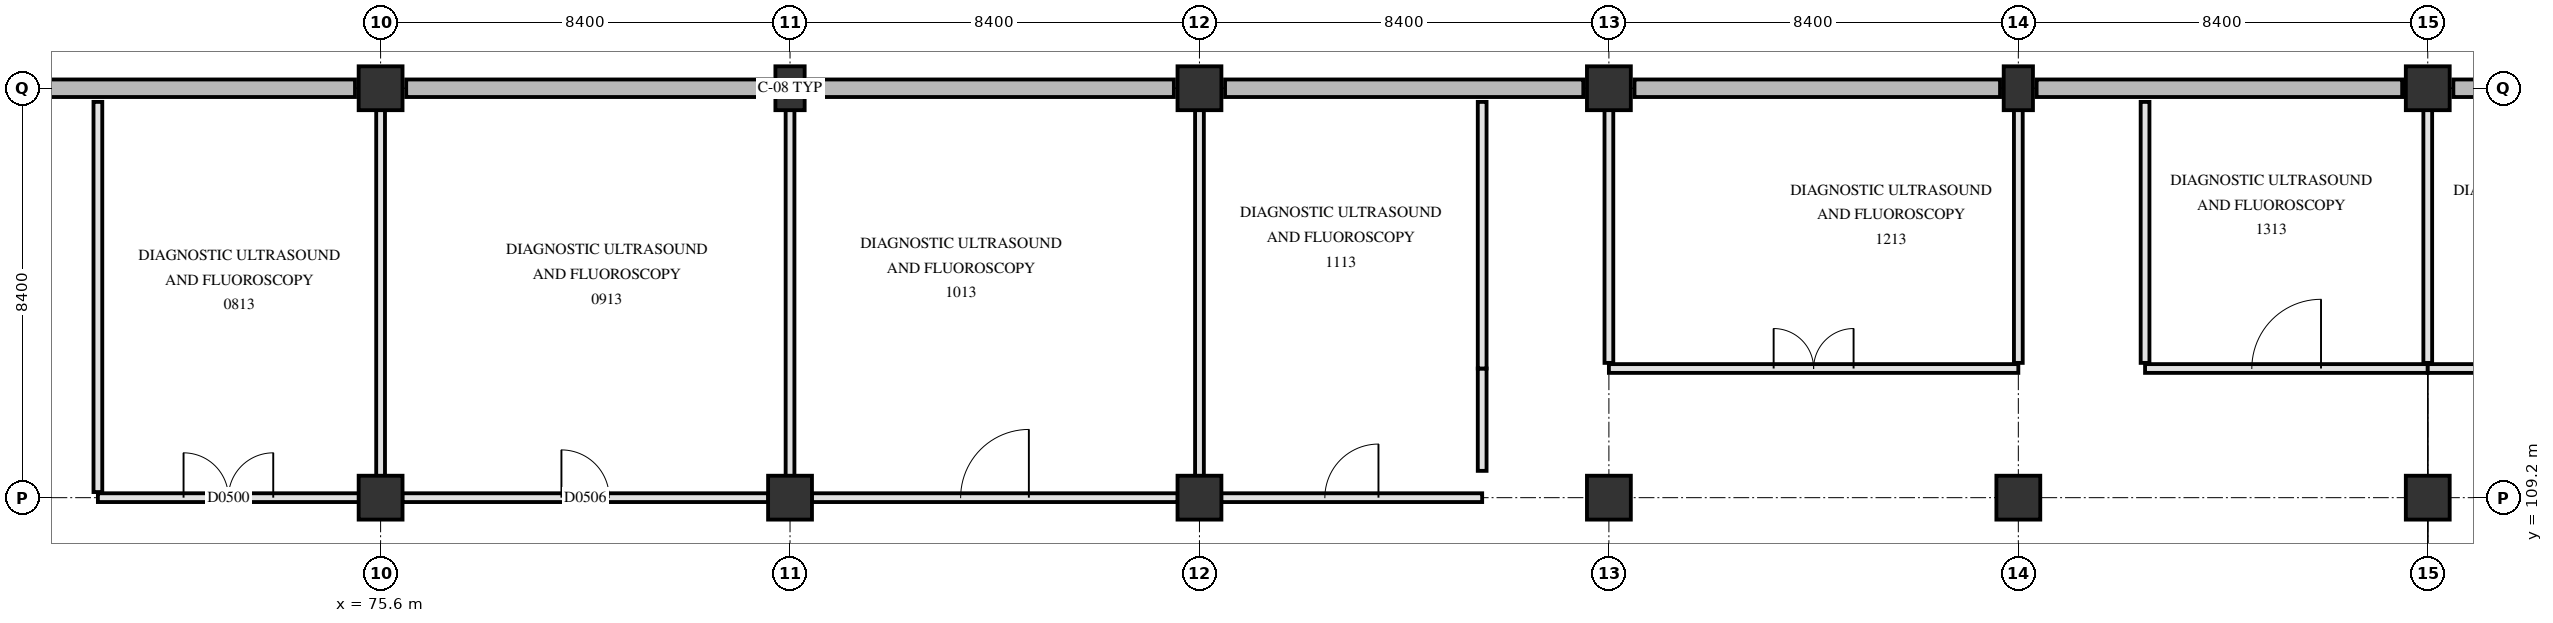
"""IFC4 building model, lengths in metres.
Left out: names, types, materials, properties, quantities, classifications, styles, units other than length and angle.
Written with IfcOpenShell. Run it as: python <this file> out.ifc"""

import sys

from ifc_helpers import new_model, si_unit, direction, frame, frame_2d, origin, origin_2d, place, context, subcontext, project, spatial, rectangle, extrude, element, fill, save


model = new_model("IFC4")
c1 = context("Model", 3, precision=1e-05, world=origin(), true_north=direction((0.0, 1.0)))
c2 = subcontext(c1, "Body", "Model", "MODEL_VIEW")
j1 = project(units=[si_unit("LENGTHUNIT", "METRE"), si_unit("PLANEANGLEUNIT", "RADIAN")], contexts=[c1])
p1 = place(None, origin())
s1 = spatial("IfcSite", under=j1, at=p1, CompositionType="ELEMENT")
p2 = place(p1, origin())
s2 = spatial("IfcBuilding", under=s1, at=p2, CompositionType="ELEMENT")
p3 = place(p2, origin())
s3 = spatial("IfcBuildingStorey", under=s2, at=p3, CompositionType="ELEMENT", Elevation=0.0)
for number, where, z_axis, x_axis in (
    (1, (75.6, 109.2, 0.0), (0.0, 0.0, 1.0), (1.0, 0.0, 0.0)),
    (2, (75.6, 117.6, 0.0), (0.0, 0.0, 1.0), (1.0, 0.0, 0.0)),
    (3, (84.0, 109.2, 0.0), (0.0, 0.0, 1.0), (1.0, 0.0, 0.0)),
):
    element("IfcColumn", number, at=place(p3, frame(where, z_axis=z_axis, x_axis=x_axis)), inside=s3, PredefinedType="COLUMN", context=c2, shape_type="SweptSolid", body=[
        extrude(rectangle(XDim=0.9, YDim=0.9, at=origin_2d()), origin(), (0.0, 0.0, 1.0), 4.8),
    ])
p4 = place(p3, frame((84.0, 117.6, 0.0), z_axis=(0.0, 0.0, 1.0), x_axis=(1.0, 0.0, 0.0)))
e4 = element("IfcColumn", 4, at=p4, inside=s3, PredefinedType="PILASTER", context=c2, shape_type="SweptSolid", body=[
    extrude(rectangle(XDim=0.6, YDim=0.9, at=origin_2d()), origin(), (0.0, 0.0, 1.0), 4.8),
])
for number, where, z_axis, x_axis in (
    (5, (92.4, 109.2, 0.0), (0.0, 0.0, 1.0), (1.0, 0.0, 0.0)),
    (6, (92.4, 117.6, 0.0), (0.0, 0.0, 1.0), (1.0, 0.0, 0.0)),
    (7, (100.8, 109.2, 0.0), (0.0, 0.0, 1.0), (1.0, 0.0, 0.0)),
    (8, (100.8, 117.6, 0.0), (0.0, 0.0, 1.0), (1.0, 0.0, 0.0)),
    (9, (109.2, 109.2, 0.0), (0.0, 0.0, 1.0), (1.0, 0.0, 0.0)),
):
    element("IfcColumn", number, at=place(p3, frame(where, z_axis=z_axis, x_axis=x_axis)), inside=s3, PredefinedType="COLUMN", context=c2, shape_type="SweptSolid", body=[
        extrude(rectangle(XDim=0.9, YDim=0.9, at=origin_2d()), origin(), (0.0, 0.0, 1.0), 4.8),
    ])
p5 = place(p3, frame((109.2, 117.6, 0.0), z_axis=(0.0, 0.0, 1.0), x_axis=(1.0, 0.0, 0.0)))
e10 = element("IfcColumn", 10, at=p5, inside=s3, PredefinedType="PILASTER", context=c2, shape_type="SweptSolid", body=[
    extrude(rectangle(XDim=0.6, YDim=0.9, at=origin_2d()), origin(), (0.0, 0.0, 1.0), 4.8),
])
for number, where, z_axis, x_axis in (
    (11, (117.6, 109.2, 0.0), (0.0, 0.0, 1.0), (1.0, 0.0, 0.0)),
    (12, (117.6, 117.6, 0.0), (0.0, 0.0, 1.0), (1.0, 0.0, 0.0)),
):
    element("IfcColumn", number, at=place(p3, frame(where, z_axis=z_axis, x_axis=x_axis)), inside=s3, PredefinedType="COLUMN", context=c2, shape_type="SweptSolid", body=[
        extrude(rectangle(XDim=0.9, YDim=0.9, at=origin_2d()), origin(), (0.0, 0.0, 1.0), 4.8),
    ])
p6 = place(p3, frame((67.725, 117.6, 0.0), z_axis=(0.0, 0.0, 1.0), x_axis=(1.0, 0.0, 0.0)))
e13 = element("IfcWall", 13, at=p6, inside=s3, PredefinedType="SOLIDWALL", context=c2, shape_type="SweptSolid", body=[
    extrude(rectangle(XDim=7.35, YDim=0.36, at=frame_2d((3.675, 0.0))), origin(), (0.0, 0.0, 1.0), 4.5),
])
for number, where, z_axis, x_axis in (
    (14, (76.125, 117.6, 0.0), (0.0, 0.0, 1.0), (1.0, 0.0, 0.0)),
    (15, (84.375, 117.6, 0.0), (0.0, 0.0, 1.0), (1.0, 0.0, 0.0)),
):
    element("IfcWall", number, at=place(p3, frame(where, z_axis=z_axis, x_axis=x_axis)), inside=s3, PredefinedType="SOLIDWALL", context=c2, shape_type="SweptSolid", body=[
        extrude(rectangle(XDim=7.5, YDim=0.36, at=frame_2d((3.75, 0.0))), origin(), (0.0, 0.0, 1.0), 4.5),
    ])
p7 = place(p3, frame((92.925, 117.6, 0.0), z_axis=(0.0, 0.0, 1.0), x_axis=(1.0, 0.0, 0.0)))
e16 = element("IfcWall", 16, at=p7, inside=s3, PredefinedType="SOLIDWALL", context=c2, shape_type="SweptSolid", body=[
    extrude(rectangle(XDim=7.35, YDim=0.36, at=frame_2d((3.675, 0.0))), origin(), (0.0, 0.0, 1.0), 4.5),
])
for number, where, z_axis, x_axis in (
    (17, (101.325, 117.6, 0.0), (0.0, 0.0, 1.0), (1.0, 0.0, 0.0)),
    (18, (109.575, 117.6, 0.0), (0.0, 0.0, 1.0), (1.0, 0.0, 0.0)),
):
    element("IfcWall", number, at=place(p3, frame(where, z_axis=z_axis, x_axis=x_axis)), inside=s3, PredefinedType="SOLIDWALL", context=c2, shape_type="SweptSolid", body=[
        extrude(rectangle(XDim=7.5, YDim=0.36, at=frame_2d((3.75, 0.0))), origin(), (0.0, 0.0, 1.0), 4.5),
    ])
p8 = place(p3, frame((118.125, 117.6, 0.0), z_axis=(0.0, 0.0, 1.0), x_axis=(1.0, 0.0, 0.0)))
e19 = element("IfcWall", 19, at=p8, inside=s3, PredefinedType="SOLIDWALL", context=c2, shape_type="SweptSolid", body=[
    extrude(rectangle(XDim=7.35, YDim=0.36, at=frame_2d((3.675, 0.0))), origin(), (0.0, 0.0, 1.0), 4.5),
])
p9 = place(p3, frame((69.8, 109.2, 0.0), z_axis=(0.0, 0.0, 1.0), x_axis=(1.0, 0.0, 0.0)))
e20 = element("IfcWall", 20, at=p9, inside=s3, PredefinedType="PARTITIONING", context=c2, shape_type="SweptSolid", body=[
    extrude(rectangle(XDim=5.355, YDim=0.18, at=frame_2d((2.677, 0.0))), origin(), (0.0, 0.0, 1.0), 3.84),
])
p10 = place(p9, frame((1.758, 0.0, 0.0)))
e21 = element("IfcOpeningElement", 21, at=p10, cuts=e20, PredefinedType="OPENING", context=c2, shape_type="SweptSolid", body=[
    extrude(rectangle(XDim=1.84, YDim=2.28, at=frame_2d((0.92, 1.14))), frame((0.0, 0.1, 0.0), z_axis=(0.0, -1.0, 0.0), x_axis=(1.0, 0.0, 0.0)), (0.0, 0.0, 1.0), 0.2),
])
p11 = place(p3, frame((76.045, 109.2, 0.0), z_axis=(0.0, 0.0, 1.0), x_axis=(1.0, 0.0, 0.0)))
e22 = element("IfcWall", 22, at=p11, inside=s3, PredefinedType="PARTITIONING", context=c2, shape_type="SweptSolid", body=[
    extrude(rectangle(XDim=7.51, YDim=0.18, at=frame_2d((3.755, 0.0))), origin(), (0.0, 0.0, 1.0), 3.84),
])
p12 = place(p11, frame((3.265, 0.0, 0.0)))
e23 = element("IfcOpeningElement", 23, at=p12, cuts=e22, PredefinedType="OPENING", context=c2, shape_type="SweptSolid", body=[
    extrude(rectangle(XDim=0.98, YDim=2.12, at=frame_2d((0.49, 1.06))), frame((0.0, 0.1, 0.0), z_axis=(0.0, -1.0, 0.0), x_axis=(1.0, 0.0, 0.0)), (0.0, 0.0, 1.0), 0.2),
])
p13 = place(p3, frame((84.445, 109.2, 0.0), z_axis=(0.0, 0.0, 1.0), x_axis=(1.0, 0.0, 0.0)))
e24 = element("IfcWall", 24, at=p13, inside=s3, PredefinedType="PARTITIONING", context=c2, shape_type="SweptSolid", body=[
    extrude(rectangle(XDim=7.51, YDim=0.18, at=frame_2d((3.755, 0.0))), origin(), (0.0, 0.0, 1.0), 3.84),
])
p14 = place(p13, frame((3.055, 0.0, 0.0)))
e25 = element("IfcOpeningElement", 25, at=p14, cuts=e24, PredefinedType="OPENING", context=c2, shape_type="SweptSolid", body=[
    extrude(rectangle(XDim=1.4, YDim=2.2, at=frame_2d((0.7, 1.1))), frame((0.0, 0.1, 0.0), z_axis=(0.0, -1.0, 0.0), x_axis=(1.0, 0.0, 0.0)), (0.0, 0.0, 1.0), 0.2),
])
p15 = place(p3, frame((92.845, 109.2, 0.0), z_axis=(0.0, 0.0, 1.0), x_axis=(1.0, 0.0, 0.0)))
e26 = element("IfcWall", 26, at=p15, inside=s3, PredefinedType="PARTITIONING", context=c2, shape_type="SweptSolid", body=[
    extrude(rectangle(XDim=5.355, YDim=0.18, at=frame_2d((2.677, 0.0))), origin(), (0.0, 0.0, 1.0), 3.84),
])
p16 = place(p15, frame((2.127, 0.0, 0.0)))
e27 = element("IfcOpeningElement", 27, at=p16, cuts=e26, PredefinedType="OPENING", context=c2, shape_type="SweptSolid", body=[
    extrude(rectangle(XDim=1.1, YDim=2.15, at=frame_2d((0.55, 1.075))), frame((0.0, 0.1, 0.0), z_axis=(0.0, -1.0, 0.0), x_axis=(1.0, 0.0, 0.0)), (0.0, 0.0, 1.0), 0.2),
])
p17 = place(p3, frame((100.8, 111.85, 0.0), z_axis=(0.0, 0.0, 1.0), x_axis=(1.0, 0.0, 0.0)))
e28 = element("IfcWall", 28, at=p17, inside=s3, PredefinedType="PARTITIONING", context=c2, shape_type="SweptSolid", body=[
    extrude(rectangle(XDim=8.4, YDim=0.18, at=frame_2d((4.2, 0.0))), origin(), (0.0, 0.0, 1.0), 3.89),
])
p18 = place(p17, frame((3.38, 0.0, 0.0)))
e29 = element("IfcOpeningElement", 29, at=p18, cuts=e28, PredefinedType="OPENING", context=c2, shape_type="SweptSolid", body=[
    extrude(rectangle(XDim=1.64, YDim=2.28, at=frame_2d((0.82, 1.14))), frame((0.0, 0.1, 0.0), z_axis=(0.0, -1.0, 0.0), x_axis=(1.0, 0.0, 0.0)), (0.0, 0.0, 1.0), 0.2),
])
p19 = place(p3, frame((111.8, 111.85, 0.0), z_axis=(0.0, 0.0, 1.0), x_axis=(1.0, 0.0, 0.0)))
e30 = element("IfcWall", 30, at=p19, inside=s3, PredefinedType="PARTITIONING", context=c2, shape_type="SweptSolid", body=[
    extrude(rectangle(XDim=5.8, YDim=0.18, at=frame_2d((2.9, 0.0))), origin(), (0.0, 0.0, 1.0), 3.89),
])
p20 = place(p19, frame((2.19, 0.0, 0.0)))
e31 = element("IfcOpeningElement", 31, at=p20, cuts=e30, PredefinedType="OPENING", context=c2, shape_type="SweptSolid", body=[
    extrude(rectangle(XDim=1.42, YDim=2.22, at=frame_2d((0.71, 1.11))), frame((0.0, 0.1, 0.0), z_axis=(0.0, -1.0, 0.0), x_axis=(1.0, 0.0, 0.0)), (0.0, 0.0, 1.0), 0.2),
])
p21 = place(p3, frame((117.6, 111.85, 0.0), z_axis=(0.0, 0.0, 1.0), x_axis=(1.0, 0.0, 0.0)))
e32 = element("IfcWall", 32, at=p21, inside=s3, PredefinedType="PARTITIONING", context=c2, shape_type="SweptSolid", body=[
    extrude(rectangle(XDim=8.4, YDim=0.18, at=frame_2d((4.2, 0.0))), origin(), (0.0, 0.0, 1.0), 3.89),
])
p22 = place(p21, frame((3.625, 0.0, 0.0)))
e33 = element("IfcOpeningElement", 33, at=p22, cuts=e32, PredefinedType="OPENING", context=c2, shape_type="SweptSolid", body=[
    extrude(rectangle(XDim=1.15, YDim=2.15, at=frame_2d((0.575, 1.075))), frame((0.0, 0.1, 0.0), z_axis=(0.0, -1.0, 0.0), x_axis=(1.0, 0.0, 0.0)), (0.0, 0.0, 1.0), 0.2),
])
p23 = place(p3, frame((69.8, 109.315, 0.0), z_axis=(0.0, 0.0, 1.0), x_axis=(0.0, 1.0, 0.0)))
e34 = element("IfcWall", 34, at=p23, inside=s3, PredefinedType="PARTITIONING", context=c2, shape_type="SweptSolid", body=[
    extrude(rectangle(XDim=8.005, YDim=0.18, at=frame_2d((4.002, 0.0))), origin(), (0.0, 0.0, 1.0), 3.84),
])
for number, where, z_axis, x_axis in (
    (35, (75.6, 109.645, 0.0), (0.0, 0.0, 1.0), (0.0, 1.0, 0.0)),
    (36, (84.0, 109.645, 0.0), (0.0, 0.0, 1.0), (0.0, 1.0, 0.0)),
    (37, (92.4, 109.645, 0.0), (0.0, 0.0, 1.0), (0.0, 1.0, 0.0)),
):
    element("IfcWall", number, at=place(p3, frame(where, z_axis=z_axis, x_axis=x_axis)), inside=s3, PredefinedType="PARTITIONING", context=c2, shape_type="SweptSolid", body=[
        extrude(rectangle(XDim=7.51, YDim=0.18, at=frame_2d((3.755, 0.0))), origin(), (0.0, 0.0, 1.0), 3.89),
    ])
p24 = place(p3, frame((98.2, 109.75, 0.0), z_axis=(0.0, 0.0, 1.0), x_axis=(0.0, 1.0, 0.0)))
e38 = element("IfcWall", 38, at=p24, inside=s3, PredefinedType="PARTITIONING", context=c2, shape_type="SweptSolid", body=[
    extrude(rectangle(XDim=2.1, YDim=0.18, at=frame_2d((1.05, 0.0))), origin(), (0.0, 0.0, 1.0), 4.49),
])
p25 = place(p3, frame((98.2, 111.85, 0.0), z_axis=(0.0, 0.0, 1.0), x_axis=(0.0, 1.0, 0.0)))
e39 = element("IfcWall", 39, at=p25, inside=s3, PredefinedType="PARTITIONING", context=c2, shape_type="SweptSolid", body=[
    extrude(rectangle(XDim=5.47, YDim=0.18, at=frame_2d((2.735, 0.0))), origin(), (0.0, 0.0, 1.0), 4.49),
])
for number, where, z_axis, x_axis in (
    (40, (100.8, 111.965, 0.0), (0.0, 0.0, 1.0), (0.0, 1.0, 0.0)),
    (41, (109.2, 111.965, 0.0), (0.0, 0.0, 1.0), (0.0, 1.0, 0.0)),
):
    element("IfcWall", number, at=place(p3, frame(where, z_axis=z_axis, x_axis=x_axis)), inside=s3, PredefinedType="PARTITIONING", context=c2, shape_type="SweptSolid", body=[
        extrude(rectangle(XDim=5.19, YDim=0.18, at=frame_2d((2.595, 0.0))), origin(), (0.0, 0.0, 1.0), 3.89),
    ])
p26 = place(p3, frame((111.8, 111.965, 0.0), z_axis=(0.0, 0.0, 1.0), x_axis=(0.0, 1.0, 0.0)))
e42 = element("IfcWall", 42, at=p26, inside=s3, PredefinedType="PARTITIONING", context=c2, shape_type="SweptSolid", body=[
    extrude(rectangle(XDim=5.355, YDim=0.18, at=frame_2d((2.677, 0.0))), origin(), (0.0, 0.0, 1.0), 4.49),
])
p27 = place(p3, frame((117.6, 111.965, 0.0), z_axis=(0.0, 0.0, 1.0), x_axis=(0.0, 1.0, 0.0)))
e43 = element("IfcWall", 43, at=p27, inside=s3, PredefinedType="PARTITIONING", context=c2, shape_type="SweptSolid", body=[
    extrude(rectangle(XDim=5.19, YDim=0.18, at=frame_2d((2.595, 0.0))), origin(), (0.0, 0.0, 1.0), 3.89),
])
p28 = place(p10, origin())
e44 = element("IfcDoor", 44, at=p28, inside=s3, OperationType="DOUBLE_SWING_LEFT", PredefinedType="DOOR", context=c2, shape_type="SweptSolid", body=[
    extrude(rectangle(XDim=1.84, YDim=2.28, at=frame_2d((0.92, 1.14))), frame((0.0, 0.025, 0.0), z_axis=(0.0, -1.0, 0.0), x_axis=(1.0, 0.0, 0.0)), (0.0, 0.0, 1.0), 0.05),
])
fill(e21, e44)
p29 = place(p12, origin())
e45 = element("IfcDoor", 45, at=p29, inside=s3, OperationType="SINGLE_SWING_LEFT", PredefinedType="DOOR", context=c2, shape_type="SweptSolid", body=[
    extrude(rectangle(XDim=0.98, YDim=2.12, at=frame_2d((0.49, 1.06))), frame((0.0, 0.025, 0.0), z_axis=(0.0, -1.0, 0.0), x_axis=(1.0, 0.0, 0.0)), (0.0, 0.0, 1.0), 0.05),
])
fill(e23, e45)
p30 = place(p14, origin())
e46 = element("IfcDoor", 46, at=p30, inside=s3, OperationType="SINGLE_SWING_RIGHT", PredefinedType="DOOR", context=c2, shape_type="SweptSolid", body=[
    extrude(rectangle(XDim=1.4, YDim=2.2, at=frame_2d((0.7, 1.1))), frame((0.0, 0.025, 0.0), z_axis=(0.0, -1.0, 0.0), x_axis=(1.0, 0.0, 0.0)), (0.0, 0.0, 1.0), 0.05),
])
fill(e25, e46)
p31 = place(p16, origin())
e47 = element("IfcDoor", 47, at=p31, inside=s3, OperationType="SINGLE_SWING_RIGHT", PredefinedType="DOOR", context=c2, shape_type="SweptSolid", body=[
    extrude(rectangle(XDim=1.1, YDim=2.15, at=frame_2d((0.55, 1.075))), frame((0.0, 0.025, 0.0), z_axis=(0.0, -1.0, 0.0), x_axis=(1.0, 0.0, 0.0)), (0.0, 0.0, 1.0), 0.05),
])
fill(e27, e47)
p32 = place(p18, origin())
e48 = element("IfcDoor", 48, at=p32, inside=s3, OperationType="DOUBLE_SWING_LEFT", PredefinedType="DOOR", context=c2, shape_type="SweptSolid", body=[
    extrude(rectangle(XDim=1.64, YDim=2.28, at=frame_2d((0.82, 1.14))), frame((0.0, 0.025, 0.0), z_axis=(0.0, -1.0, 0.0), x_axis=(1.0, 0.0, 0.0)), (0.0, 0.0, 1.0), 0.05),
])
fill(e29, e48)
p33 = place(p20, origin())
e49 = element("IfcDoor", 49, at=p33, inside=s3, OperationType="SINGLE_SWING_RIGHT", PredefinedType="DOOR", context=c2, shape_type="SweptSolid", body=[
    extrude(rectangle(XDim=1.42, YDim=2.22, at=frame_2d((0.71, 1.11))), frame((0.0, 0.025, 0.0), z_axis=(0.0, -1.0, 0.0), x_axis=(1.0, 0.0, 0.0)), (0.0, 0.0, 1.0), 0.05),
])
fill(e31, e49)
save(model, sys.argv[1])
